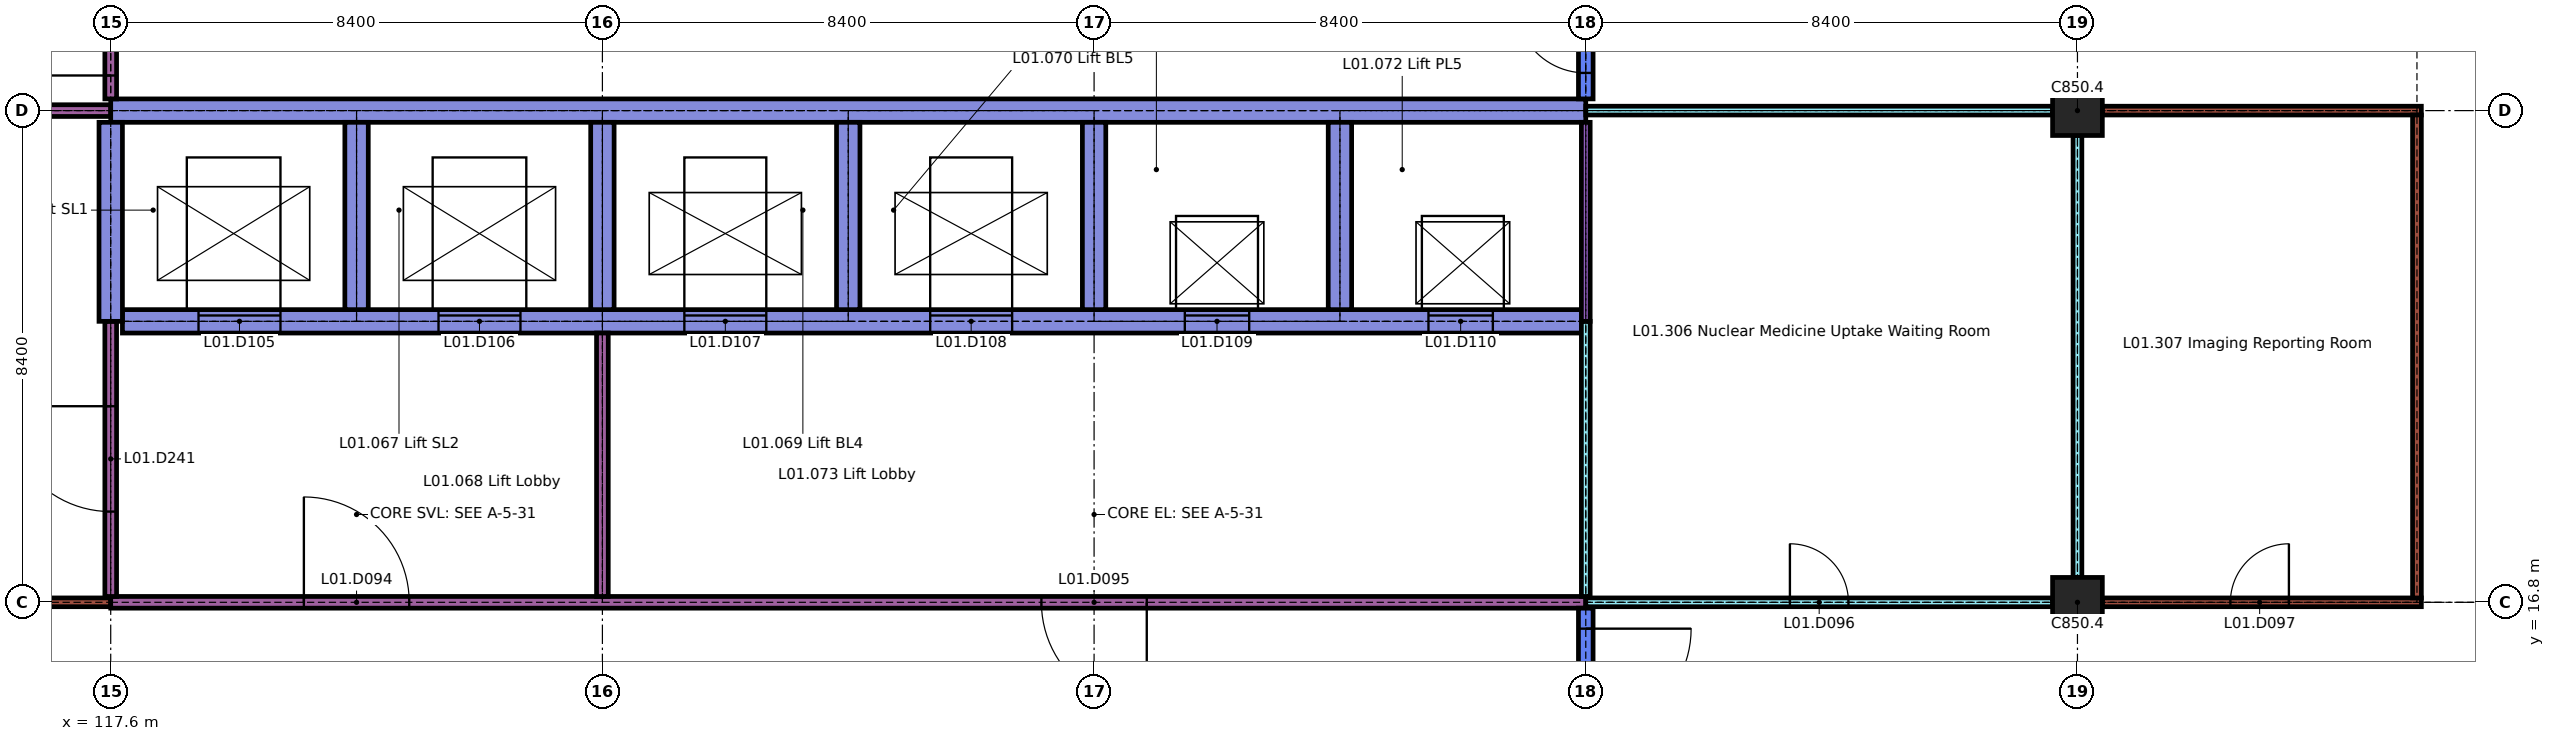
"""IFC4 building model, lengths in metres.
Left out: names, types, materials, properties, quantities, classifications, styles, units other than length and angle.
Written with IfcOpenShell. Run it as: python <this file> out.ifc"""

import sys

from ifc_helpers import new_model, si_unit, direction, frame, frame_2d, origin, origin_2d, place, context, subcontext, project, spatial, rectangle, extrude, element, fill, save


model = new_model("IFC4")
c1 = context("Model", 3, precision=1e-05, world=origin(), true_north=direction((0.0, 1.0)))
c2 = subcontext(c1, "Body", "Model", "MODEL_VIEW")
j1 = project(units=[si_unit("LENGTHUNIT", "METRE"), si_unit("PLANEANGLEUNIT", "RADIAN")], contexts=[c1])
p1 = place(None, origin())
s1 = spatial("IfcSite", under=j1, at=p1, CompositionType="ELEMENT")
p2 = place(p1, origin())
s2 = spatial("IfcBuilding", under=s1, at=p2, CompositionType="ELEMENT")
p3 = place(p2, frame((0.0, 0.0, 4.5)))
s3 = spatial("IfcBuildingStorey", under=s2, at=p3, CompositionType="ELEMENT", Elevation=4.5)
for number, where, z_axis, x_axis in (
    (1, (151.2, 16.8, 0.0), (0.0, 0.0, 1.0), (1.0, 0.0, 0.0)),
    (2, (151.2, 25.2, 0.0), (0.0, 0.0, 1.0), (1.0, 0.0, 0.0)),
):
    element("IfcColumn", number, at=place(p3, frame(where, z_axis=z_axis, x_axis=x_axis)), inside=s3, PredefinedType="COLUMN", context=c2, shape_type="SweptSolid", body=[
        extrude(rectangle(XDim=0.85, YDim=0.85, at=origin_2d()), origin(), (0.0, 0.0, 1.0), 3.45),
    ])
p4 = place(p3, frame((109.65, 16.8, 0.0), z_axis=(0.0, 0.0, 1.0), x_axis=(1.0, 0.0, 0.0)))
e3 = element("IfcWall", 3, at=p4, inside=s3, PredefinedType="PARTITIONING", context=c2, shape_type="SweptSolid", body=[
    extrude(rectangle(XDim=7.95, YDim=0.15, at=frame_2d((3.975, 0.0))), origin(), (0.0, 0.0, 1.0), 3.45),
])
p5 = place(p4, frame((3.275, 0.0, 0.0)))
e4 = element("IfcOpeningElement", 4, at=p5, cuts=e3, PredefinedType="OPENING", context=c2, shape_type="SweptSolid", body=[
    extrude(rectangle(XDim=1.4, YDim=2.1, at=frame_2d((0.7, 1.05))), frame((0.0, 0.085, 0.0), z_axis=(0.0, -1.0, 0.0), x_axis=(1.0, 0.0, 0.0)), (0.0, 0.0, 1.0), 0.17),
])
p6 = place(p3, frame((117.6, 16.8, 0.0), z_axis=(0.0, 0.0, 1.0), x_axis=(1.0, 0.0, 0.0)))
e5 = element("IfcWall", 5, at=p6, inside=s3, PredefinedType="PARTITIONING", context=c2, shape_type="SweptSolid", body=[
    extrude(rectangle(XDim=25.2, YDim=0.2, at=frame_2d((12.6, 0.0))), origin(), (0.0, 0.0, 1.0), 3.45),
])
p7 = place(p6, frame((3.3, 0.0, 0.0)))
e6 = element("IfcOpeningElement", 6, at=p7, cuts=e5, PredefinedType="OPENING", context=c2, shape_type="SweptSolid", body=[
    extrude(rectangle(XDim=1.8, YDim=2.4, at=frame_2d((0.9, 1.2))), frame((0.0, 0.11, 0.0), z_axis=(0.0, -1.0, 0.0), x_axis=(1.0, 0.0, 0.0)), (0.0, 0.0, 1.0), 0.22),
])
p8 = place(p6, frame((15.9, 0.0, 0.0)))
e7 = element("IfcOpeningElement", 7, at=p8, cuts=e5, PredefinedType="OPENING", context=c2, shape_type="SweptSolid", body=[
    extrude(rectangle(XDim=1.8, YDim=2.4, at=frame_2d((0.9, 1.2))), frame((0.0, 0.11, 0.0), z_axis=(0.0, -1.0, 0.0), x_axis=(1.0, 0.0, 0.0)), (0.0, 0.0, 1.0), 0.22),
])
p9 = place(p3, frame((142.8, 16.8, 0.0), z_axis=(0.0, 0.0, 1.0), x_axis=(1.0, 0.0, 0.0)))
e8 = element("IfcWall", 8, at=p9, inside=s3, PredefinedType="PARTITIONING", context=c2, shape_type="SweptSolid", body=[
    extrude(rectangle(XDim=7.975, YDim=0.15, at=frame_2d((3.987, 0.0))), origin(), (0.0, 0.0, 1.0), 3.45),
])
p10 = place(p9, frame((3.488, 0.0, 0.0)))
e9 = element("IfcOpeningElement", 9, at=p10, cuts=e8, PredefinedType="OPENING", context=c2, shape_type="SweptSolid", body=[
    extrude(rectangle(XDim=1.0, YDim=2.1, at=frame_2d((0.5, 1.05))), frame((0.0, 0.085, 0.0), z_axis=(0.0, -1.0, 0.0), x_axis=(1.0, 0.0, 0.0)), (0.0, 0.0, 1.0), 0.17),
])
p11 = place(p3, frame((151.625, 16.8, 0.0), z_axis=(0.0, 0.0, 1.0), x_axis=(1.0, 0.0, 0.0)))
e10 = element("IfcWall", 10, at=p11, inside=s3, PredefinedType="PARTITIONING", context=c2, shape_type="SweptSolid", body=[
    extrude(rectangle(XDim=5.45, YDim=0.15, at=frame_2d((2.725, 0.0))), origin(), (0.0, 0.0, 1.0), 3.45),
])
p12 = place(p11, frame((2.188, 0.0, 0.0)))
e11 = element("IfcOpeningElement", 11, at=p12, cuts=e10, PredefinedType="OPENING", context=c2, shape_type="SweptSolid", body=[
    extrude(rectangle(XDim=1.0, YDim=2.1, at=frame_2d((0.5, 1.05))), frame((0.0, 0.085, 0.0), z_axis=(0.0, -1.0, 0.0), x_axis=(1.0, 0.0, 0.0)), (0.0, 0.0, 1.0), 0.17),
])
p13 = place(p3, frame((117.8, 21.6, 0.0), z_axis=(0.0, 0.0, 1.0), x_axis=(1.0, 0.0, 0.0)))
e12 = element("IfcWall", 12, at=p13, inside=s3, PredefinedType="SHEAR", context=c2, shape_type="SweptSolid", body=[
    extrude(rectangle(XDim=24.925, YDim=0.4, at=frame_2d((12.462, 0.0))), origin(), (0.0, 0.0, 1.0), 3.45),
])
p14 = place(p13, frame((1.3, 0.0, 0.0)))
e13 = element("IfcOpeningElement", 13, at=p14, cuts=e12, PredefinedType="OPENING", context=c2, shape_type="SweptSolid", body=[
    extrude(rectangle(XDim=1.4, YDim=2.1, at=frame_2d((0.7, 1.05))), frame((0.0, 0.21, 0.0), z_axis=(0.0, -1.0, 0.0), x_axis=(1.0, 0.0, 0.0)), (0.0, 0.0, 1.0), 0.42),
])
p15 = place(p13, frame((5.4, 0.0, 0.0)))
e14 = element("IfcOpeningElement", 14, at=p15, cuts=e12, PredefinedType="OPENING", context=c2, shape_type="SweptSolid", body=[
    extrude(rectangle(XDim=1.4, YDim=2.1, at=frame_2d((0.7, 1.05))), frame((0.0, 0.21, 0.0), z_axis=(0.0, -1.0, 0.0), x_axis=(1.0, 0.0, 0.0)), (0.0, 0.0, 1.0), 0.42),
])
p16 = place(p13, frame((9.6, 0.0, 0.0)))
e15 = element("IfcOpeningElement", 15, at=p16, cuts=e12, PredefinedType="OPENING", context=c2, shape_type="SweptSolid", body=[
    extrude(rectangle(XDim=1.4, YDim=2.1, at=frame_2d((0.7, 1.05))), frame((0.0, 0.21, 0.0), z_axis=(0.0, -1.0, 0.0), x_axis=(1.0, 0.0, 0.0)), (0.0, 0.0, 1.0), 0.42),
])
p17 = place(p13, frame((13.8, 0.0, 0.0)))
e16 = element("IfcOpeningElement", 16, at=p17, cuts=e12, PredefinedType="OPENING", context=c2, shape_type="SweptSolid", body=[
    extrude(rectangle(XDim=1.4, YDim=2.1, at=frame_2d((0.7, 1.05))), frame((0.0, 0.21, 0.0), z_axis=(0.0, -1.0, 0.0), x_axis=(1.0, 0.0, 0.0)), (0.0, 0.0, 1.0), 0.42),
])
p18 = place(p13, frame((18.15, 0.0, 0.0)))
e17 = element("IfcOpeningElement", 17, at=p18, cuts=e12, PredefinedType="OPENING", context=c2, shape_type="SweptSolid", body=[
    extrude(rectangle(XDim=1.1, YDim=2.1, at=frame_2d((0.55, 1.05))), frame((0.0, 0.21, 0.0), z_axis=(0.0, -1.0, 0.0), x_axis=(1.0, 0.0, 0.0)), (0.0, 0.0, 1.0), 0.42),
])
p19 = place(p13, frame((22.312, 0.0, 0.0)))
e18 = element("IfcOpeningElement", 18, at=p19, cuts=e12, PredefinedType="OPENING", context=c2, shape_type="SweptSolid", body=[
    extrude(rectangle(XDim=1.1, YDim=2.1, at=frame_2d((0.55, 1.05))), frame((0.0, 0.21, 0.0), z_axis=(0.0, -1.0, 0.0), x_axis=(1.0, 0.0, 0.0)), (0.0, 0.0, 1.0), 0.42),
])
p20 = place(p3, frame((109.2, 25.2, 0.0), z_axis=(0.0, 0.0, 1.0), x_axis=(1.0, 0.0, 0.0)))
e19 = element("IfcWall", 19, at=p20, inside=s3, PredefinedType="PARTITIONING", context=c2, shape_type="SweptSolid", body=[
    extrude(rectangle(XDim=8.4, YDim=0.2, at=frame_2d((4.2, 0.0))), origin(), (0.0, 0.0, 1.0), 3.45),
])
p21 = place(p20, frame((3.5, 0.0, 0.0)))
e20 = element("IfcOpeningElement", 20, at=p21, cuts=e19, PredefinedType="OPENING", context=c2, shape_type="SweptSolid", body=[
    extrude(rectangle(XDim=1.4, YDim=2.1, at=frame_2d((0.7, 1.05))), frame((0.0, 0.11, 0.0), z_axis=(0.0, -1.0, 0.0), x_axis=(1.0, 0.0, 0.0)), (0.0, 0.0, 1.0), 0.22),
])
p22 = place(p3, frame((117.6, 25.2, 0.0), z_axis=(0.0, 0.0, 1.0), x_axis=(1.0, 0.0, 0.0)))
e21 = element("IfcWall", 21, at=p22, inside=s3, PredefinedType="SHEAR", context=c2, shape_type="SweptSolid", body=[
    extrude(rectangle(XDim=25.2, YDim=0.4, at=frame_2d((12.6, 0.0))), origin(), (0.0, 0.0, 1.0), 3.45),
])
p23 = place(p3, frame((142.8, 25.2, 0.0), z_axis=(0.0, 0.0, 1.0), x_axis=(1.0, 0.0, 0.0)))
e22 = element("IfcWall", 22, at=p23, inside=s3, PredefinedType="PARTITIONING", context=c2, shape_type="SweptSolid", body=[
    extrude(rectangle(XDim=7.975, YDim=0.15, at=frame_2d((3.987, 0.0))), origin(), (0.0, 0.0, 1.0), 3.45),
])
p24 = place(p3, frame((151.625, 25.2, 0.0), z_axis=(0.0, 0.0, 1.0), x_axis=(1.0, 0.0, 0.0)))
e23 = element("IfcWall", 23, at=p24, inside=s3, PredefinedType="PARTITIONING", context=c2, shape_type="SweptSolid", body=[
    extrude(rectangle(XDim=5.45, YDim=0.15, at=frame_2d((2.725, 0.0))), origin(), (0.0, 0.0, 1.0), 3.45),
])
p25 = place(p3, frame((117.6, 16.9, 0.0), z_axis=(0.0, 0.0, 1.0), x_axis=(0.0, 1.0, 0.0)))
e24 = element("IfcWall", 24, at=p25, inside=s3, PredefinedType="PARTITIONING", context=c2, shape_type="SweptSolid", body=[
    extrude(rectangle(XDim=4.7, YDim=0.2, at=frame_2d((2.35, 0.0))), origin(), (0.0, 0.0, 1.0), 3.45),
])
p26 = place(p25, frame((1.45, 0.0, 0.0)))
e25 = element("IfcOpeningElement", 25, at=p26, cuts=e24, PredefinedType="OPENING", context=c2, shape_type="SweptSolid", body=[
    extrude(rectangle(XDim=1.8, YDim=2.4, at=frame_2d((0.9, 1.2))), frame((0.0, 0.11, 0.0), z_axis=(0.0, -1.0, 0.0), x_axis=(1.0, 0.0, 0.0)), (0.0, 0.0, 1.0), 0.22),
])
p27 = place(p3, frame((117.6, 21.6, 0.0), z_axis=(0.0, 0.0, 1.0), x_axis=(0.0, 1.0, 0.0)))
e26 = element("IfcWall", 26, at=p27, inside=s3, PredefinedType="SHEAR", context=c2, shape_type="SweptSolid", body=[
    extrude(rectangle(XDim=3.4, YDim=0.4, at=frame_2d((1.7, 0.0))), origin(), (0.0, 0.0, 1.0), 3.45),
])
p28 = place(p3, frame((117.6, 25.4, 0.0), z_axis=(0.0, 0.0, 1.0), x_axis=(0.0, 1.0, 0.0)))
e27 = element("IfcWall", 27, at=p28, inside=s3, PredefinedType="PARTITIONING", context=c2, shape_type="SweptSolid", body=[
    extrude(rectangle(XDim=4.6, YDim=0.2, at=frame_2d((2.3, 0.0))), origin(), (0.0, 0.0, 1.0), 3.45),
])
p29 = place(p28, frame((0.4, 0.0, 0.0)))
e28 = element("IfcOpeningElement", 28, at=p29, cuts=e27, PredefinedType="OPENING", context=c2, shape_type="SweptSolid", body=[
    extrude(rectangle(XDim=1.4, YDim=2.1, at=frame_2d((0.7, 1.05))), frame((0.0, 0.11, 0.0), z_axis=(0.0, -1.0, 0.0), x_axis=(1.0, 0.0, 0.0)), (0.0, 0.0, 1.0), 0.22),
])
p30 = place(p3, frame((121.8, 21.8, 0.0), z_axis=(0.0, 0.0, 1.0), x_axis=(0.0, 1.0, 0.0)))
e29 = element("IfcWall", 29, at=p30, inside=s3, PredefinedType="SHEAR", context=c2, shape_type="SweptSolid", body=[
    extrude(rectangle(XDim=3.2, YDim=0.4, at=frame_2d((1.6, 0.0))), origin(), (0.0, 0.0, 1.0), 3.45),
])
p31 = place(p3, frame((126.0, 16.9, 0.0), z_axis=(0.0, 0.0, 1.0), x_axis=(0.0, 1.0, 0.0)))
e30 = element("IfcWall", 30, at=p31, inside=s3, PredefinedType="PARTITIONING", context=c2, shape_type="SweptSolid", body=[
    extrude(rectangle(XDim=4.5, YDim=0.2, at=frame_2d((2.25, 0.0))), origin(), (0.0, 0.0, 1.0), 3.45),
])
for number, where, z_axis, x_axis in (
    (31, (126.0, 21.8, 0.0), (0.0, 0.0, 1.0), (0.0, 1.0, 0.0)),
    (32, (130.2, 21.8, 0.0), (0.0, 0.0, 1.0), (0.0, 1.0, 0.0)),
    (33, (134.4, 21.8, 0.0), (0.0, 0.0, 1.0), (0.0, 1.0, 0.0)),
    (34, (138.6, 21.8, 0.0), (0.0, 0.0, 1.0), (0.0, 1.0, 0.0)),
):
    element("IfcWall", number, at=place(p3, frame(where, z_axis=z_axis, x_axis=x_axis)), inside=s3, PredefinedType="SHEAR", context=c2, shape_type="SweptSolid", body=[
        extrude(rectangle(XDim=3.2, YDim=0.4, at=frame_2d((1.6, 0.0))), origin(), (0.0, 0.0, 1.0), 3.45),
    ])
p32 = place(p3, frame((142.8, 6.0, 0.0), z_axis=(0.0, 0.0, 1.0), x_axis=(0.0, 1.0, 0.0)))
e35 = element("IfcWall", 35, at=p32, inside=s3, PredefinedType="SOLIDWALL", context=c2, shape_type="SweptSolid", body=[
    extrude(rectangle(XDim=10.7, YDim=0.25, at=frame_2d((5.35, 0.0))), origin(), (0.0, 0.0, 1.0), 3.45),
])
p33 = place(p32, frame((0.5, 0.0, 0.0)))
e36 = element("IfcOpeningElement", 36, at=p33, cuts=e35, PredefinedType="OPENING", context=c2, shape_type="SweptSolid", body=[
    extrude(rectangle(XDim=1.4, YDim=2.1, at=frame_2d((0.7, 1.05))), frame((0.0, 0.135, 0.0), z_axis=(0.0, -1.0, 0.0), x_axis=(1.0, 0.0, 0.0)), (0.0, 0.0, 1.0), 0.27),
])
p34 = place(p32, frame((8.55, 0.0, 0.0)))
e37 = element("IfcOpeningElement", 37, at=p34, cuts=e35, PredefinedType="OPENING", context=c2, shape_type="SweptSolid", body=[
    extrude(rectangle(XDim=1.8, YDim=2.4, at=frame_2d((0.9, 1.2))), frame((0.0, 0.135, 0.0), z_axis=(0.0, -1.0, 0.0), x_axis=(1.0, 0.0, 0.0)), (0.0, 0.0, 1.0), 0.27),
])
p35 = place(p3, frame((142.8, 16.9, 0.0), z_axis=(0.0, 0.0, 1.0), x_axis=(0.0, 1.0, 0.0)))
e38 = element("IfcWall", 38, at=p35, inside=s3, PredefinedType="PARTITIONING", context=c2, shape_type="SweptSolid", body=[
    extrude(rectangle(XDim=4.7, YDim=0.15, at=frame_2d((2.35, 0.0))), origin(), (0.0, 0.0, 1.0), 3.45),
])
p36 = place(p3, frame((142.8, 21.6, 0.0), z_axis=(0.0, 0.0, 1.0), x_axis=(0.0, 1.0, 0.0)))
e39 = element("IfcWall", 39, at=p36, inside=s3, PredefinedType="PARTITIONING", context=c2, shape_type="SweptSolid", body=[
    extrude(rectangle(XDim=3.4, YDim=0.15, at=frame_2d((1.7, 0.0))), origin(), (0.0, 0.0, 1.0), 3.45),
])
p37 = place(p3, frame((142.8, 25.4, 0.0), z_axis=(0.0, 0.0, 1.0), x_axis=(0.0, 1.0, 0.0)))
e40 = element("IfcWall", 40, at=p37, inside=s3, PredefinedType="SOLIDWALL", context=c2, shape_type="SweptSolid", body=[
    extrude(rectangle(XDim=2.088, YDim=0.25, at=frame_2d((1.044, 0.0))), origin(), (0.0, 0.0, 1.0), 3.45),
])
p38 = place(p37, frame((0.444, 0.0, 0.0)))
e41 = element("IfcOpeningElement", 41, at=p38, cuts=e40, PredefinedType="OPENING", context=c2, shape_type="SweptSolid", body=[
    extrude(rectangle(XDim=1.2, YDim=2.1, at=frame_2d((0.6, 1.05))), frame((0.0, 0.135, 0.0), z_axis=(0.0, -1.0, 0.0), x_axis=(1.0, 0.0, 0.0)), (0.0, 0.0, 1.0), 0.27),
])
p39 = place(p3, frame((151.2, 17.225, 0.0), z_axis=(0.0, 0.0, 1.0), x_axis=(0.0, 1.0, 0.0)))
e42 = element("IfcWall", 42, at=p39, inside=s3, PredefinedType="PARTITIONING", context=c2, shape_type="SweptSolid", body=[
    extrude(rectangle(XDim=7.55, YDim=0.15, at=frame_2d((3.775, 0.0))), origin(), (0.0, 0.0, 1.0), 3.45),
])
p40 = place(p3, frame((157.0, 16.875, 0.0), z_axis=(0.0, 0.0, 1.0), x_axis=(0.0, 1.0, 0.0)))
e43 = element("IfcWall", 43, at=p40, inside=s3, PredefinedType="PARTITIONING", context=c2, shape_type="SweptSolid", body=[
    extrude(rectangle(XDim=8.25, YDim=0.15, at=frame_2d((4.125, 0.0))), origin(), (0.0, 0.0, 1.0), 3.45),
])
p41 = place(p7, origin())
e44 = element("IfcDoor", 44, at=p41, inside=s3, OperationType="SINGLE_SWING_RIGHT", PredefinedType="DOOR", context=c2, shape_type="SweptSolid", body=[
    extrude(rectangle(XDim=1.8, YDim=2.4, at=frame_2d((0.9, 1.2))), frame((0.0, 0.03, 0.0), z_axis=(0.0, -1.0, 0.0), x_axis=(1.0, 0.0, 0.0)), (0.0, 0.0, 1.0), 0.06),
])
fill(e6, e44)
p42 = place(p8, origin())
e45 = element("IfcDoor", 45, at=p42, inside=s3, OperationType="SINGLE_SWING_RIGHT", PredefinedType="DOOR", context=c2, shape_type="SweptSolid", body=[
    extrude(rectangle(XDim=1.8, YDim=2.4, at=frame_2d((0.9, 1.2))), frame((0.0, 0.03, 0.0), z_axis=(0.0, -1.0, 0.0), x_axis=(1.0, 0.0, 0.0)), (0.0, 0.0, 1.0), 0.06),
])
fill(e7, e45)
p43 = place(p10, origin())
e46 = element("IfcDoor", 46, at=p43, inside=s3, OperationType="SINGLE_SWING_RIGHT", PredefinedType="DOOR", context=c2, shape_type="SweptSolid", body=[
    extrude(rectangle(XDim=1.0, YDim=2.1, at=frame_2d((0.5, 1.05))), frame((0.0, 0.04, 0.0), z_axis=(0.0, -1.0, 0.0), x_axis=(1.0, 0.0, 0.0)), (0.0, 0.0, 1.0), 0.08),
])
fill(e9, e46)
p44 = place(p12, origin())
e47 = element("IfcDoor", 47, at=p44, inside=s3, OperationType="SINGLE_SWING_LEFT", PredefinedType="DOOR", context=c2, shape_type="SweptSolid", body=[
    extrude(rectangle(XDim=1.0, YDim=2.1, at=frame_2d((0.5, 1.05))), frame((0.0, 0.025, 0.0), z_axis=(0.0, -1.0, 0.0), x_axis=(1.0, 0.0, 0.0)), (0.0, 0.0, 1.0), 0.05),
])
fill(e11, e47)
p45 = place(p14, origin())
e48 = element("IfcDoor", 48, at=p45, inside=s3, OperationType="SLIDING_TO_LEFT", PredefinedType="DOOR", context=c2, shape_type="SweptSolid", body=[
    extrude(rectangle(XDim=1.4, YDim=2.1, at=frame_2d((0.7, 1.05))), frame((0.0, 0.025, 0.0), z_axis=(0.0, -1.0, 0.0), x_axis=(1.0, 0.0, 0.0)), (0.0, 0.0, 1.0), 0.05),
])
fill(e13, e48)
p46 = place(p15, origin())
e49 = element("IfcDoor", 49, at=p46, inside=s3, OperationType="SLIDING_TO_LEFT", PredefinedType="DOOR", context=c2, shape_type="SweptSolid", body=[
    extrude(rectangle(XDim=1.4, YDim=2.1, at=frame_2d((0.7, 1.05))), frame((0.0, 0.025, 0.0), z_axis=(0.0, -1.0, 0.0), x_axis=(1.0, 0.0, 0.0)), (0.0, 0.0, 1.0), 0.05),
])
fill(e14, e49)
p47 = place(p16, origin())
e50 = element("IfcDoor", 50, at=p47, inside=s3, OperationType="SLIDING_TO_LEFT", PredefinedType="DOOR", context=c2, shape_type="SweptSolid", body=[
    extrude(rectangle(XDim=1.4, YDim=2.1, at=frame_2d((0.7, 1.05))), frame((0.0, 0.025, 0.0), z_axis=(0.0, -1.0, 0.0), x_axis=(1.0, 0.0, 0.0)), (0.0, 0.0, 1.0), 0.05),
])
fill(e15, e50)
p48 = place(p17, origin())
e51 = element("IfcDoor", 51, at=p48, inside=s3, OperationType="SLIDING_TO_LEFT", PredefinedType="DOOR", context=c2, shape_type="SweptSolid", body=[
    extrude(rectangle(XDim=1.4, YDim=2.1, at=frame_2d((0.7, 1.05))), frame((0.0, 0.025, 0.0), z_axis=(0.0, -1.0, 0.0), x_axis=(1.0, 0.0, 0.0)), (0.0, 0.0, 1.0), 0.05),
])
fill(e16, e51)
p49 = place(p18, origin())
e52 = element("IfcDoor", 52, at=p49, inside=s3, OperationType="SLIDING_TO_LEFT", PredefinedType="DOOR", context=c2, shape_type="SweptSolid", body=[
    extrude(rectangle(XDim=1.1, YDim=2.1, at=frame_2d((0.55, 1.05))), frame((0.0, 0.025, 0.0), z_axis=(0.0, -1.0, 0.0), x_axis=(1.0, 0.0, 0.0)), (0.0, 0.0, 1.0), 0.05),
])
fill(e17, e52)
p50 = place(p19, origin())
e53 = element("IfcDoor", 53, at=p50, inside=s3, OperationType="SLIDING_TO_LEFT", PredefinedType="DOOR", context=c2, shape_type="SweptSolid", body=[
    extrude(rectangle(XDim=1.1, YDim=2.1, at=frame_2d((0.55, 1.05))), frame((0.0, 0.025, 0.0), z_axis=(0.0, -1.0, 0.0), x_axis=(1.0, 0.0, 0.0)), (0.0, 0.0, 1.0), 0.05),
])
fill(e18, e53)
p51 = place(p26, origin())
e54 = element("IfcDoor", 54, at=p51, inside=s3, OperationType="SINGLE_SWING_LEFT", PredefinedType="DOOR", context=c2, shape_type="SweptSolid", body=[
    extrude(rectangle(XDim=1.8, YDim=2.4, at=frame_2d((0.9, 1.2))), frame((0.0, 0.025, 0.0), z_axis=(0.0, -1.0, 0.0), x_axis=(1.0, 0.0, 0.0)), (0.0, 0.0, 1.0), 0.05),
])
fill(e25, e54)
p52 = place(p29, origin())
e55 = element("IfcDoor", 55, at=p52, inside=s3, OperationType="SINGLE_SWING_RIGHT", PredefinedType="DOOR", context=c2, shape_type="SweptSolid", body=[
    extrude(rectangle(XDim=1.4, YDim=2.1, at=frame_2d((0.7, 1.05))), frame((0.0, 0.03, 0.0), z_axis=(0.0, -1.0, 0.0), x_axis=(1.0, 0.0, 0.0)), (0.0, 0.0, 1.0), 0.06),
])
fill(e28, e55)
p53 = place(p34, origin())
e56 = element("IfcDoor", 56, at=p53, inside=s3, OperationType="SINGLE_SWING_RIGHT", PredefinedType="DOOR", context=c2, shape_type="SweptSolid", body=[
    extrude(rectangle(XDim=1.8, YDim=2.4, at=frame_2d((0.9, 1.2))), frame((0.0, 0.03, 0.0), z_axis=(0.0, -1.0, 0.0), x_axis=(1.0, 0.0, 0.0)), (0.0, 0.0, 1.0), 0.06),
])
fill(e37, e56)
p54 = place(p38, origin())
e57 = element("IfcDoor", 57, at=p54, inside=s3, OperationType="SINGLE_SWING_LEFT", PredefinedType="DOOR", context=c2, shape_type="SweptSolid", body=[
    extrude(rectangle(XDim=1.2, YDim=2.1, at=frame_2d((0.6, 1.05))), frame((0.0, 0.03, 0.0), z_axis=(0.0, -1.0, 0.0), x_axis=(1.0, 0.0, 0.0)), (0.0, 0.0, 1.0), 0.06),
])
fill(e41, e57)
save(model, sys.argv[1])
